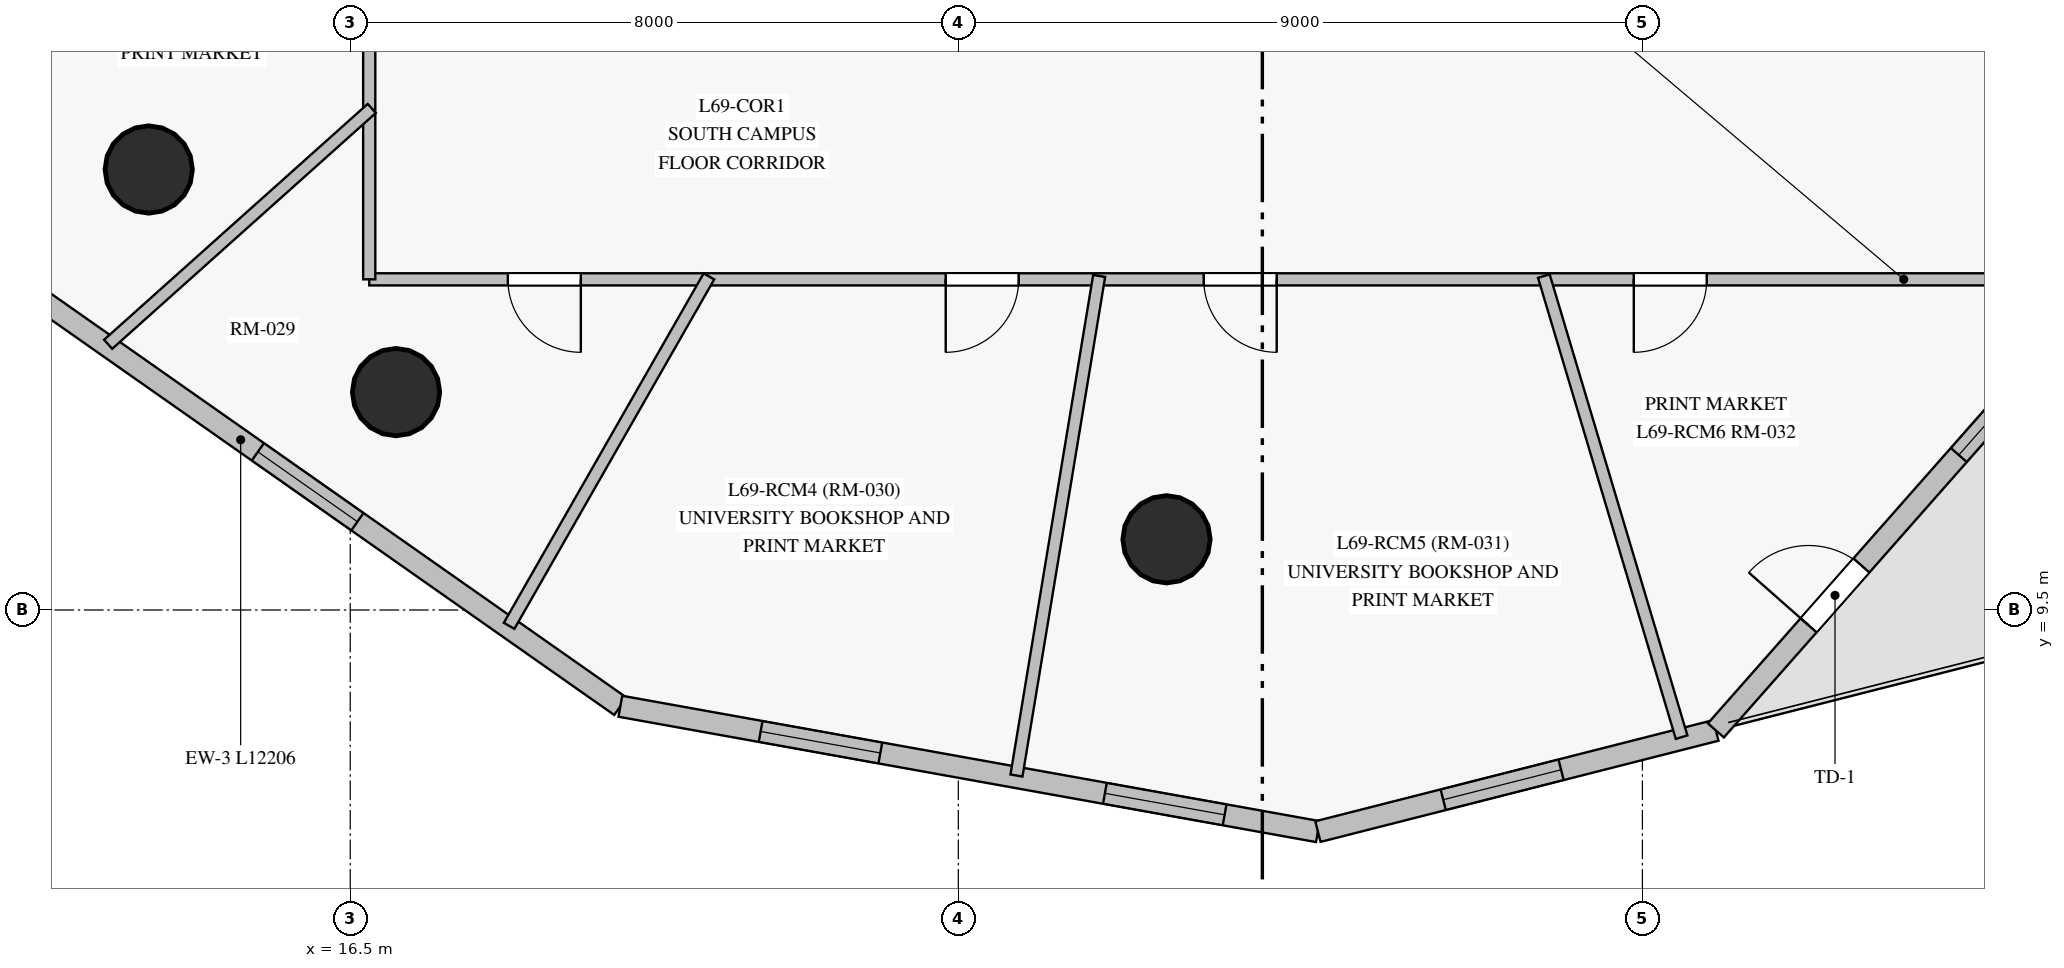
"""IFC4 building model, lengths in metres.
Left out: names, types, materials, properties, quantities, classifications, styles, units other than length and angle.
Written with IfcOpenShell. Run it as: python <this file> out.ifc"""

import sys

from ifc_helpers import new_model, si_unit, direction, frame, frame_2d, origin, origin_with_axes, origin_2d, place, context, subcontext, project, spatial, rectangle, circle, extrude, source, transform, mapped, element, fill, save


model = new_model("IFC4")
c1 = context("Model", 3, precision=1e-05, world=origin(), true_north=direction((0.0, 1.0)))
c2 = subcontext(c1, "Body", "Model", "MODEL_VIEW")
j1 = project(units=[si_unit("LENGTHUNIT", "METRE"), si_unit("PLANEANGLEUNIT", "RADIAN")], contexts=[c1])
p1 = place(None, origin())
s1 = spatial("IfcSite", under=j1, at=p1, CompositionType="ELEMENT")
p2 = place(p1, origin())
s2 = spatial("IfcBuilding", under=s1, at=p2, CompositionType="ELEMENT")
p3 = place(p2, frame((0.0, 0.0, 235.2)))
s3 = spatial("IfcBuildingStorey", under=s2, at=p3, CompositionType="ELEMENT", Elevation=235.2)
m1 = source(origin_with_axes(), c2, "Body", "SweptSolid", [
    extrude(circle(Radius=0.575, at=origin_2d()), origin(), (0.0, 0.0, 1.0), 3.05),
])
for number, where, z_axis, x_axis in (
    (1, (13.849, 15.295, 0.0), (0.0, 0.0, 1.0), (1.0, 0.0, 0.0)),
    (2, (17.103, 12.366, 0.0), (0.0, 0.0, 1.0), (1.0, 0.0, 0.0)),
    (3, (27.239, 10.43, 0.0), (0.0, 0.0, 1.0), (1.0, 0.0, 0.0)),
):
    element("IfcColumn", number, at=place(p3, frame(where, z_axis=z_axis, x_axis=x_axis)), inside=s3, PredefinedType="COLUMN", context=c2, shape_type="MappedRepresentation", body=[
        mapped(m1, transform((0.0, 0.0, 0.0), scale=1.0)),
    ])
p4 = place(p3, frame((10.063, 15.246, 0.0), z_axis=(0.0, 0.0, 1.0), x_axis=(0.818518081976, -0.574480765108, 0.0)))
e4 = element("IfcWall", 4, at=p4, inside=s3, PredefinedType="SOLIDWALL", context=c2, shape_type="SweptSolid", body=[
    extrude(rectangle(XDim=12.206, YDim=0.28, at=frame_2d((6.103, 0.0))), origin(), (0.0, 0.0, 1.0), 2.85),
])
p5 = place(p4, frame((1.211, 0.0, 0.85)))
e5 = element("IfcOpeningElement", 5, at=p5, cuts=e4, PredefinedType="OPENING", context=c2, shape_type="SweptSolid", body=[
    extrude(rectangle(XDim=1.6, YDim=1.6, at=frame_2d((0.8, 0.8))), frame((0.0, 0.15, 0.0), z_axis=(0.0, -1.0, 0.0), x_axis=(1.0, 0.0, 0.0)), (0.0, 0.0, 1.0), 0.3),
])
p6 = place(p4, frame((6.379, 0.0, 0.85)))
e6 = element("IfcOpeningElement", 6, at=p6, cuts=e4, PredefinedType="OPENING", context=c2, shape_type="SweptSolid", body=[
    extrude(rectangle(XDim=1.6, YDim=1.6, at=frame_2d((0.8, 0.8))), frame((0.0, 0.15, 0.0), z_axis=(0.0, -1.0, 0.0), x_axis=(1.0, 0.0, 0.0)), (0.0, 0.0, 1.0), 0.3),
])
p7 = place(p3, frame((20.054, 8.233, 0.0), z_axis=(0.0, 0.0, 1.0), x_axis=(0.984242708318, -0.176822767546, 0.0)))
e7 = element("IfcWall", 7, at=p7, inside=s3, PredefinedType="SOLIDWALL", context=c2, shape_type="SweptSolid", body=[
    extrude(rectangle(XDim=9.324, YDim=0.28, at=frame_2d((4.662, 0.0))), origin(), (0.0, 0.0, 1.0), 2.85),
])
p8 = place(p7, frame((1.875, 0.0, 0.85)))
e8 = element("IfcOpeningElement", 8, at=p8, cuts=e7, PredefinedType="OPENING", context=c2, shape_type="SweptSolid", body=[
    extrude(rectangle(XDim=1.6, YDim=1.6, at=frame_2d((0.8, 0.8))), frame((0.0, 0.15, 0.0), z_axis=(0.0, -1.0, 0.0), x_axis=(1.0, 0.0, 0.0)), (0.0, 0.0, 1.0), 0.3),
])
p9 = place(p7, frame((6.477, 0.0, 0.85)))
e9 = element("IfcOpeningElement", 9, at=p9, cuts=e7, PredefinedType="OPENING", context=c2, shape_type="SweptSolid", body=[
    extrude(rectangle(XDim=1.6, YDim=1.6, at=frame_2d((0.8, 0.8))), frame((0.0, 0.15, 0.0), z_axis=(0.0, -1.0, 0.0), x_axis=(1.0, 0.0, 0.0)), (0.0, 0.0, 1.0), 0.3),
])
p10 = place(p3, frame((29.231, 6.585, 0.0), z_axis=(0.0, 0.0, 1.0), x_axis=(0.969169811516, 0.246393742709, 0.0)))
e10 = element("IfcWall", 10, at=p10, inside=s3, PredefinedType="SOLIDWALL", context=c2, shape_type="SweptSolid", body=[
    extrude(rectangle(XDim=5.402, YDim=0.28, at=frame_2d((2.701, 0.0))), origin(), (0.0, 0.0, 1.0), 2.85),
])
p11 = place(p10, frame((1.701, 0.0, 0.85)))
e11 = element("IfcOpeningElement", 11, at=p11, cuts=e10, PredefinedType="OPENING", context=c2, shape_type="SweptSolid", body=[
    extrude(rectangle(XDim=1.6, YDim=1.6, at=frame_2d((0.8, 0.8))), frame((0.0, 0.15, 0.0), z_axis=(0.0, -1.0, 0.0), x_axis=(1.0, 0.0, 0.0)), (0.0, 0.0, 1.0), 0.3),
])
p12 = place(p3, frame((34.467, 7.916, 0.0), z_axis=(0.0, 0.0, 1.0), x_axis=(0.661518096325, 0.749929202148, 0.0)))
e12 = element("IfcWall", 12, at=p12, inside=s3, PredefinedType="SOLIDWALL", context=c2, shape_type="SweptSolid", body=[
    extrude(rectangle(XDim=18.952, YDim=0.28, at=frame_2d((9.476, 0.0))), origin(), (0.0, 0.0, 1.0), 2.85),
])
p13 = place(p12, frame((4.831, 0.0, 0.85)))
e13 = element("IfcOpeningElement", 13, at=p13, cuts=e12, PredefinedType="OPENING", context=c2, shape_type="SweptSolid", body=[
    extrude(rectangle(XDim=1.6, YDim=1.6, at=frame_2d((0.8, 0.8))), frame((0.0, 0.15, 0.0), z_axis=(0.0, -1.0, 0.0), x_axis=(1.0, 0.0, 0.0)), (0.0, 0.0, 1.0), 0.3),
])
p14 = place(p12, frame((12.161, 0.0, 0.85)))
e14 = element("IfcOpeningElement", 14, at=p14, cuts=e12, PredefinedType="OPENING", context=c2, shape_type="SweptSolid", body=[
    extrude(rectangle(XDim=1.6, YDim=1.6, at=frame_2d((0.8, 0.8))), frame((0.0, 0.15, 0.0), z_axis=(0.0, -1.0, 0.0), x_axis=(1.0, 0.0, 0.0)), (0.0, 0.0, 1.0), 0.3),
])
p15 = place(p12, frame((16.489, 0.0, 0.85)))
e15 = element("IfcOpeningElement", 15, at=p15, cuts=e12, PredefinedType="OPENING", context=c2, shape_type="SweptSolid", body=[
    extrude(rectangle(XDim=1.6, YDim=1.6, at=frame_2d((0.8, 0.8))), frame((0.0, 0.15, 0.0), z_axis=(0.0, -1.0, 0.0), x_axis=(1.0, 0.0, 0.0)), (0.0, 0.0, 1.0), 0.3),
])
p16 = place(p12, frame((1.844, 0.0, 0.0)))
e16 = element("IfcOpeningElement", 16, at=p16, cuts=e12, PredefinedType="OPENING", context=c2, shape_type="SweptSolid", body=[
    extrude(rectangle(XDim=1.05, YDim=2.12, at=frame_2d((0.525, 1.06))), frame((0.0, 0.15, 0.0), z_axis=(0.0, -1.0, 0.0), x_axis=(1.0, 0.0, 0.0)), (0.0, 0.0, 1.0), 0.3),
])
p17 = place(p3, frame((39.53, 13.85, 0.0), z_axis=(0.0, 0.0, 1.0), x_axis=(-1.0, 0.0, 0.0)))
e17 = element("IfcWall", 17, at=p17, inside=s3, PredefinedType="PARTITIONING", context=c2, shape_type="SweptSolid", body=[
    extrude(rectangle(XDim=22.78, YDim=0.16, at=frame_2d((11.39, 0.0))), origin(), (0.0, 0.0, 1.0), 2.3),
])
p18 = place(p17, frame((19.996, 0.0, 0.0)))
e18 = element("IfcOpeningElement", 18, at=p18, cuts=e17, PredefinedType="OPENING", context=c2, shape_type="SweptSolid", body=[
    extrude(rectangle(XDim=0.96, YDim=2.15, at=frame_2d((0.48, 1.075))), frame((0.0, 0.09, 0.0), z_axis=(0.0, -1.0, 0.0), x_axis=(1.0, 0.0, 0.0)), (0.0, 0.0, 1.0), 0.18),
])
p19 = place(p17, frame((14.236, 0.0, 0.0)))
e19 = element("IfcOpeningElement", 19, at=p19, cuts=e17, PredefinedType="OPENING", context=c2, shape_type="SweptSolid", body=[
    extrude(rectangle(XDim=0.96, YDim=2.15, at=frame_2d((0.48, 1.075))), frame((0.0, 0.09, 0.0), z_axis=(0.0, -1.0, 0.0), x_axis=(1.0, 0.0, 0.0)), (0.0, 0.0, 1.0), 0.18),
])
p20 = place(p17, frame((10.841, 0.0, 0.0)))
e20 = element("IfcOpeningElement", 20, at=p20, cuts=e17, PredefinedType="OPENING", context=c2, shape_type="SweptSolid", body=[
    extrude(rectangle(XDim=0.96, YDim=2.15, at=frame_2d((0.48, 1.075))), frame((0.0, 0.09, 0.0), z_axis=(0.0, -1.0, 0.0), x_axis=(1.0, 0.0, 0.0)), (0.0, 0.0, 1.0), 0.18),
])
p21 = place(p17, frame((5.183, 0.0, 0.0)))
e21 = element("IfcOpeningElement", 21, at=p21, cuts=e17, PredefinedType="OPENING", context=c2, shape_type="SweptSolid", body=[
    extrude(rectangle(XDim=0.96, YDim=2.15, at=frame_2d((0.48, 1.075))), frame((0.0, 0.09, 0.0), z_axis=(0.0, -1.0, 0.0), x_axis=(1.0, 0.0, 0.0)), (0.0, 0.0, 1.0), 0.18),
])
p22 = place(p3, frame((16.75, 13.85, 0.0), z_axis=(0.0, 0.0, 1.0), x_axis=(0.0, 1.0, 0.0)))
e22 = element("IfcWall", 22, at=p22, inside=s3, PredefinedType="PARTITIONING", context=c2, shape_type="SweptSolid", body=[
    extrude(rectangle(XDim=17.8, YDim=0.16, at=frame_2d((8.9, 0.0))), origin(), (0.0, 0.0, 1.0), 2.45),
])
p23 = place(p22, frame((12.394, 0.0, 0.0)))
e23 = element("IfcOpeningElement", 23, at=p23, cuts=e22, PredefinedType="OPENING", context=c2, shape_type="SweptSolid", body=[
    extrude(rectangle(XDim=0.96, YDim=2.15, at=frame_2d((0.48, 1.075))), frame((0.0, 0.09, 0.0), z_axis=(0.0, -1.0, 0.0), x_axis=(1.0, 0.0, 0.0)), (0.0, 0.0, 1.0), 0.18),
])
p24 = place(p22, frame((9.691, 0.0, 0.0)))
e24 = element("IfcOpeningElement", 24, at=p24, cuts=e22, PredefinedType="OPENING", context=c2, shape_type="SweptSolid", body=[
    extrude(rectangle(XDim=0.86, YDim=2.1, at=frame_2d((0.43, 1.05))), frame((0.0, 0.09, 0.0), z_axis=(0.0, -1.0, 0.0), x_axis=(1.0, 0.0, 0.0)), (0.0, 0.0, 1.0), 0.18),
])
p25 = place(p22, frame((8.185, 0.0, 0.0)))
e25 = element("IfcOpeningElement", 25, at=p25, cuts=e22, PredefinedType="OPENING", context=c2, shape_type="SweptSolid", body=[
    extrude(rectangle(XDim=0.96, YDim=2.15, at=frame_2d((0.48, 1.075))), frame((0.0, 0.09, 0.0), z_axis=(0.0, -1.0, 0.0), x_axis=(1.0, 0.0, 0.0)), (0.0, 0.0, 1.0), 0.18),
])
p26 = place(p22, frame((5.165, 0.0, 0.0)))
e26 = element("IfcOpeningElement", 26, at=p26, cuts=e22, PredefinedType="OPENING", context=c2, shape_type="SweptSolid", body=[
    extrude(rectangle(XDim=0.96, YDim=2.15, at=frame_2d((0.48, 1.075))), frame((0.0, 0.09, 0.0), z_axis=(0.0, -1.0, 0.0), x_axis=(1.0, 0.0, 0.0)), (0.0, 0.0, 1.0), 0.18),
])
p27 = place(p22, frame((15.776, 0.0, 0.0)))
e27 = element("IfcOpeningElement", 27, at=p27, cuts=e22, PredefinedType="OPENING", context=c2, shape_type="SweptSolid", body=[
    extrude(rectangle(XDim=0.96, YDim=2.15, at=frame_2d((0.48, 1.075))), frame((0.0, 0.09, 0.0), z_axis=(0.0, -1.0, 0.0), x_axis=(1.0, 0.0, 0.0)), (0.0, 0.0, 1.0), 0.18),
])
p28 = place(p3, frame((16.777, 20.462, 0.0), z_axis=(0.0, 0.0, 1.0), x_axis=(-0.886916138467, -0.46193047456, 0.0)))
e28 = element("IfcWall", 28, at=p28, inside=s3, PredefinedType="PARTITIONING", context=c2, shape_type="SweptSolid", body=[
    extrude(rectangle(XDim=8.115, YDim=0.16, at=frame_2d((4.058, 0.0))), origin(), (0.0, 0.0, 1.0), 2.85),
])
p29 = place(p3, frame((26.353, 13.894, 0.0), z_axis=(0.0, 0.0, 1.0), x_axis=(-0.163245838204, -0.986585422713, 0.0)))
e29 = element("IfcWall", 29, at=p29, inside=s3, PredefinedType="PARTITIONING", context=c2, shape_type="SweptSolid", body=[
    extrude(rectangle(XDim=6.661, YDim=0.16, at=frame_2d((3.331, 0.0))), origin(), (0.0, 0.0, 1.0), 2.35),
])
p30 = place(p3, frame((32.204, 13.893, 0.0), z_axis=(0.0, 0.0, 1.0), x_axis=(0.286236858114, -0.958158891341, 0.0)))
e30 = element("IfcWall", 30, at=p30, inside=s3, PredefinedType="PARTITIONING", context=c2, shape_type="SweptSolid", body=[
    extrude(rectangle(XDim=6.331, YDim=0.16, at=frame_2d((3.166, 0.0))), origin(), (0.0, 0.0, 1.0), 2.85),
])
p31 = place(p3, frame((21.219, 13.889, 0.0), z_axis=(0.0, 0.0, 1.0), x_axis=(-0.49643181117, -0.868075720694, 0.0)))
e31 = element("IfcWall", 31, at=p31, inside=s3, PredefinedType="PARTITIONING", context=c2, shape_type="SweptSolid", body=[
    extrude(rectangle(XDim=5.296, YDim=0.16, at=frame_2d((2.648, 0.0))), origin(), (0.0, 0.0, 1.0), 2.85),
])
p32 = place(p3, frame((16.784, 16.098, 0.0), z_axis=(0.0, 0.0, 1.0), x_axis=(-0.745307168069, -0.666721250017, 0.0)))
e32 = element("IfcWall", 32, at=p32, inside=s3, PredefinedType="PARTITIONING", context=c2, shape_type="SweptSolid", body=[
    extrude(rectangle(XDim=4.654, YDim=0.16, at=frame_2d((2.327, 0.0))), origin(), (0.0, 0.0, 1.0), 2.85),
])
m2 = source(origin_with_axes(), c2, "Body", "SweptSolid", [
    extrude(rectangle(XDim=1.6, YDim=1.6, at=frame_2d((0.8, 0.8))), frame((0.0, 0.03, 0.0), z_axis=(0.0, -1.0, 0.0), x_axis=(1.0, 0.0, 0.0)), (0.0, 0.0, 1.0), 0.06),
])
p33 = place(p6, origin())
e33 = element("IfcWindow", 33, at=p33, inside=s3, PartitioningType="SINGLE_PANEL", PredefinedType="WINDOW", context=c2, shape_type="MappedRepresentation", body=[
    mapped(m2, transform((0.0, 0.0, 0.0), scale=1.0)),
])
fill(e6, e33)
p34 = place(p8, origin())
e34 = element("IfcWindow", 34, at=p34, inside=s3, PartitioningType="SINGLE_PANEL", PredefinedType="WINDOW", context=c2, shape_type="MappedRepresentation", body=[
    mapped(m2, transform((0.0, 0.0, 0.0), scale=1.0)),
])
fill(e8, e34)
p35 = place(p9, origin())
e35 = element("IfcWindow", 35, at=p35, inside=s3, PartitioningType="SINGLE_PANEL", PredefinedType="WINDOW", context=c2, shape_type="MappedRepresentation", body=[
    mapped(m2, transform((0.0, 0.0, 0.0), scale=1.0)),
])
fill(e9, e35)
p36 = place(p11, origin())
e36 = element("IfcWindow", 36, at=p36, inside=s3, PartitioningType="SINGLE_PANEL", PredefinedType="WINDOW", context=c2, shape_type="MappedRepresentation", body=[
    mapped(m2, transform((0.0, 0.0, 0.0), scale=1.0)),
])
fill(e11, e36)
p37 = place(p13, origin())
e37 = element("IfcWindow", 37, at=p37, inside=s3, PartitioningType="SINGLE_PANEL", PredefinedType="WINDOW", context=c2, shape_type="MappedRepresentation", body=[
    mapped(m2, transform((0.0, 0.0, 0.0), scale=1.0)),
])
fill(e13, e37)
m3 = source(origin_with_axes(), c2, "Body", "SweptSolid", [
    extrude(rectangle(XDim=1.05, YDim=2.12, at=frame_2d((0.525, 1.06))), frame((0.0, 0.025, 0.0), z_axis=(0.0, -1.0, 0.0), x_axis=(1.0, 0.0, 0.0)), (0.0, 0.0, 1.0), 0.05),
])
p38 = place(p16, origin())
e38 = element("IfcDoor", 38, at=p38, inside=s3, OperationType="SINGLE_SWING_LEFT", PredefinedType="DOOR", context=c2, shape_type="MappedRepresentation", body=[
    mapped(m3, transform((0.0, 0.0, 0.0), scale=1.0)),
])
fill(e16, e38)
m4 = source(origin_with_axes(), c2, "Body", "SweptSolid", [
    extrude(rectangle(XDim=0.96, YDim=2.15, at=frame_2d((0.48, 1.075))), frame((0.0, 0.025, 0.0), z_axis=(0.0, -1.0, 0.0), x_axis=(1.0, 0.0, 0.0)), (0.0, 0.0, 1.0), 0.05),
])
p39 = place(p18, origin())
e39 = element("IfcDoor", 39, at=p39, inside=s3, OperationType="SINGLE_SWING_LEFT", PredefinedType="DOOR", context=c2, shape_type="MappedRepresentation", body=[
    mapped(m4, transform((0.0, 0.0, 0.0), scale=1.0)),
])
fill(e18, e39)
p40 = place(p19, origin())
e40 = element("IfcDoor", 40, at=p40, inside=s3, OperationType="SINGLE_SWING_RIGHT", PredefinedType="DOOR", context=c2, shape_type="MappedRepresentation", body=[
    mapped(m4, transform((0.0, 0.0, 0.0), scale=1.0)),
])
fill(e19, e40)
p41 = place(p20, origin())
e41 = element("IfcDoor", 41, at=p41, inside=s3, OperationType="SINGLE_SWING_LEFT", PredefinedType="DOOR", context=c2, shape_type="MappedRepresentation", body=[
    mapped(m4, transform((0.0, 0.0, 0.0), scale=1.0)),
])
fill(e20, e41)
p42 = place(p21, origin())
e42 = element("IfcDoor", 42, at=p42, inside=s3, OperationType="SINGLE_SWING_RIGHT", PredefinedType="DOOR", context=c2, shape_type="MappedRepresentation", body=[
    mapped(m4, transform((0.0, 0.0, 0.0), scale=1.0)),
])
fill(e21, e42)
save(model, sys.argv[1])
